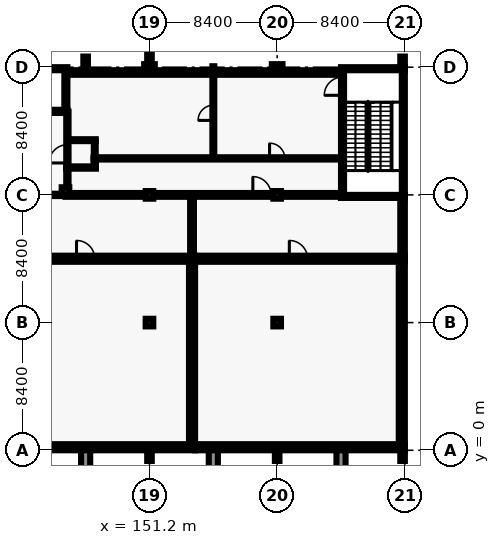
"""IFC4 building model, lengths in metres.
Left out: names, types, materials, properties, quantities, classifications, styles, units other than length and angle.
Written with IfcOpenShell. Run it as: python <this file> out.ifc"""

import sys

from ifc_helpers import new_model, si_unit, direction, frame, frame_2d, origin, origin_2d, place, context, subcontext, project, spatial, rectangle, extrude, element, fill, save


model = new_model("IFC4")
c1 = context("Model", 3, precision=1e-05, world=origin(), true_north=direction((0.0, 1.0)))
c2 = subcontext(c1, "Body", "Model", "MODEL_VIEW")
j1 = project(units=[si_unit("LENGTHUNIT", "METRE"), si_unit("PLANEANGLEUNIT", "RADIAN")], contexts=[c1])
p1 = place(None, origin())
s1 = spatial("IfcSite", under=j1, at=p1, CompositionType="ELEMENT")
p2 = place(p1, origin())
s2 = spatial("IfcBuilding", under=s1, at=p2, CompositionType="ELEMENT")
p3 = place(p2, frame((0.0, 0.0, 10.2)))
s3 = spatial("IfcBuildingStorey", under=s2, at=p3, CompositionType="ELEMENT", Elevation=10.2)
for number, where, z_axis, x_axis in (
    (1, (168.0, 16.7, 0.0), (0.0, 0.0, 1.0), (-1.0, 0.0, 0.0)),
    (2, (163.8, 25.1, 0.0), (0.0, 0.0, 1.0), (1.0, 0.0, 0.0)),
):
    element("IfcWall", number, at=place(p3, frame(where, z_axis=z_axis, x_axis=x_axis)), inside=s3, PredefinedType="SHEAR", context=c2, shape_type="SweptSolid", body=[
        extrude(rectangle(XDim=4.199, YDim=0.2, at=frame_2d((2.1, 0.0))), origin(), (0.0, 0.0, 1.0), 4.8),
    ])
p4 = place(p3, frame((163.9, 16.8, 0.0), z_axis=(0.0, 0.0, 1.0), x_axis=(0.0, 1.0, 0.0)))
e3 = element("IfcWall", 3, at=p4, inside=s3, PredefinedType="SHEAR", context=c2, shape_type="SweptSolid", body=[
    extrude(rectangle(XDim=8.2, YDim=0.2, at=frame_2d((4.1, 0.0))), origin(), (0.0, 0.0, 1.0), 4.8),
])
p5 = place(p4, frame((6.55, 0.0, 0.0)))
e4 = element("IfcOpeningElement", 4, at=p5, cuts=e3, PredefinedType="OPENING", context=c2, shape_type="SweptSolid", body=[
    extrude(rectangle(XDim=1.2, YDim=2.1, at=frame_2d((0.6, 1.05))), frame((0.0, 0.11, 0.0), z_axis=(0.0, -1.0, 0.0), x_axis=(1.0, 0.0, 0.0)), (0.0, 0.0, 1.0), 0.22),
])
p6 = place(p3, frame((167.9, 25.0, 0.0), z_axis=(0.0, 0.0, 1.0), x_axis=(0.0, -1.0, 0.0)))
e5 = element("IfcWall", 5, at=p6, inside=s3, PredefinedType="SHEAR", context=c2, shape_type="SweptSolid", body=[
    extrude(rectangle(XDim=8.2, YDim=0.2, at=frame_2d((4.1, 0.0))), origin(), (0.0, 0.0, 1.0), 4.8),
])
p7 = place(p3, frame((145.8, 22.3, 0.0), z_axis=(0.0, 0.0, 1.0), x_axis=(-1.0, 0.0, 0.0)))
e6 = element("IfcWall", 6, at=p7, inside=s3, PredefinedType="SHEAR", context=c2, shape_type="SweptSolid", body=[
    extrude(rectangle(XDim=4.2, YDim=0.2, at=frame_2d((2.1, 0.0))), origin(), (0.0, 0.0, 1.0), 4.8),
])
p8 = place(p7, frame((1.55, 0.0, 0.0)))
e7 = element("IfcOpeningElement", 7, at=p8, cuts=e6, PredefinedType="OPENING", context=c2, shape_type="SweptSolid", body=[
    extrude(rectangle(XDim=1.1, YDim=2.1, at=frame_2d((0.55, 1.05))), frame((0.0, 0.11, 0.0), z_axis=(0.0, -1.0, 0.0), x_axis=(1.0, 0.0, 0.0)), (0.0, 0.0, 1.0), 0.22),
])
p9 = place(p3, frame((141.6, 25.1, 0.0), z_axis=(0.0, 0.0, 1.0), x_axis=(1.0, 0.0, 0.0)))
e8 = element("IfcWall", 8, at=p9, inside=s3, PredefinedType="SHEAR", context=c2, shape_type="SweptSolid", body=[
    extrude(rectangle(XDim=4.2, YDim=0.2, at=frame_2d((2.1, 0.0))), origin(), (0.0, 0.0, 1.0), 4.8),
])
p10 = place(p3, frame((145.7, 25.0, 0.0), z_axis=(0.0, 0.0, 1.0), x_axis=(0.0, -1.0, 0.0)))
e9 = element("IfcWall", 9, at=p10, inside=s3, PredefinedType="SHEAR", context=c2, shape_type="SweptSolid", body=[
    extrude(rectangle(XDim=2.6, YDim=0.2, at=frame_2d((1.3, 0.0))), origin(), (0.0, 0.0, 1.0), 4.8),
])
p11 = place(p3, frame((154.2, 0.2, 0.0), z_axis=(0.0, 0.0, 1.0), x_axis=(-1.0, 0.0, 0.0)))
e10 = element("IfcWall", 10, at=p11, inside=s3, PredefinedType="SHEAR", context=c2, shape_type="SweptSolid", body=[
    extrude(rectangle(XDim=14.0, YDim=0.4, at=frame_2d((7.0, 0.0))), origin(), (0.0, 0.0, 1.0), 4.8),
])
p12 = place(p3, frame((140.2, 12.6, 0.0), z_axis=(0.0, 0.0, 1.0), x_axis=(1.0, 0.0, 0.0)))
e11 = element("IfcWall", 11, at=p12, inside=s3, PredefinedType="SHEAR", context=c2, shape_type="SweptSolid", body=[
    extrude(rectangle(XDim=14.0, YDim=0.4, at=frame_2d((7.0, 0.0))), origin(), (0.0, 0.0, 1.0), 4.8),
])
p13 = place(p12, frame((6.2, 0.0, 0.0)))
e12 = element("IfcOpeningElement", 12, at=p13, cuts=e11, PredefinedType="OPENING", context=c2, shape_type="SweptSolid", body=[
    extrude(rectangle(XDim=1.2, YDim=2.1, at=frame_2d((0.6, 1.05))), frame((0.0, 0.21, 0.0), z_axis=(0.0, -1.0, 0.0), x_axis=(1.0, 0.0, 0.0)), (0.0, 0.0, 1.0), 0.42),
])
p14 = place(p3, frame((154.0, 12.4, 0.0), z_axis=(0.0, 0.0, 1.0), x_axis=(0.0, -1.0, 0.0)))
e13 = element("IfcWall", 13, at=p14, inside=s3, PredefinedType="SHEAR", context=c2, shape_type="SweptSolid", body=[
    extrude(rectangle(XDim=12.0, YDim=0.4, at=frame_2d((6.0, 0.0))), origin(), (0.0, 0.0, 1.0), 4.8),
])
p15 = place(p3, frame((168.0, 0.2, 0.0), z_axis=(0.0, 0.0, 1.0), x_axis=(-1.0, 0.0, 0.0)))
e14 = element("IfcWall", 14, at=p15, inside=s3, PredefinedType="SHEAR", context=c2, shape_type="SweptSolid", body=[
    extrude(rectangle(XDim=13.8, YDim=0.4, at=frame_2d((6.9, 0.0))), origin(), (0.0, 0.0, 1.0), 4.8),
])
p16 = place(p3, frame((154.2, 12.6, 0.0), z_axis=(0.0, 0.0, 1.0), x_axis=(1.0, 0.0, 0.0)))
e15 = element("IfcWall", 15, at=p16, inside=s3, PredefinedType="SHEAR", context=c2, shape_type="SweptSolid", body=[
    extrude(rectangle(XDim=13.8, YDim=0.4, at=frame_2d((6.9, 0.0))), origin(), (0.0, 0.0, 1.0), 4.8),
])
p17 = place(p16, frame((6.2, 0.0, 0.0)))
e16 = element("IfcOpeningElement", 16, at=p17, cuts=e15, PredefinedType="OPENING", context=c2, shape_type="SweptSolid", body=[
    extrude(rectangle(XDim=1.2, YDim=2.1, at=frame_2d((0.6, 1.05))), frame((0.0, 0.21, 0.0), z_axis=(0.0, -1.0, 0.0), x_axis=(1.0, 0.0, 0.0)), (0.0, 0.0, 1.0), 0.42),
])
p18 = place(p3, frame((167.8, 12.4, 0.0), z_axis=(0.0, 0.0, 1.0), x_axis=(0.0, -1.0, 0.0)))
e17 = element("IfcWall", 17, at=p18, inside=s3, PredefinedType="SHEAR", context=c2, shape_type="SweptSolid", body=[
    extrude(rectangle(XDim=12.0, YDim=0.4, at=frame_2d((6.0, 0.0))), origin(), (0.0, 0.0, 1.0), 4.8),
])
p19 = place(p3, frame((167.85, 16.6, 0.0), z_axis=(0.0, 0.0, 1.0), x_axis=(0.0, -1.0, 0.0)))
e18 = element("IfcWall", 18, at=p19, inside=s3, PredefinedType="SOLIDWALL", context=c2, shape_type="SweptSolid", body=[
    extrude(rectangle(XDim=3.8, YDim=0.3, at=frame_2d((1.9, 0.0))), origin(), (0.0, 0.0, 1.0), 4.8),
])
for number, where, z_axis, x_axis in (
    (19, (151.2, 8.4, 0.0), (0.0, 0.0, 1.0), (1.0, 0.0, 0.0)),
    (20, (151.2, 16.8, 0.0), (0.0, 0.0, 1.0), (1.0, 0.0, 0.0)),
):
    element("IfcColumn", number, at=place(p3, frame(where, z_axis=z_axis, x_axis=x_axis)), inside=s3, PredefinedType="COLUMN", context=c2, shape_type="SweptSolid", body=[
        extrude(rectangle(XDim=0.5, YDim=0.5, at=origin_2d()), origin(), (0.0, 0.0, 1.0), 4.8),
    ])
p20 = place(p3, frame((151.2, 25.2, 0.0), z_axis=(0.0, 0.0, 1.0), x_axis=(1.0, 0.0, 0.0)))
e21 = element("IfcColumn", 21, at=p20, inside=s3, PredefinedType="COLUMN", context=c2, shape_type="SweptSolid", body=[
    extrude(rectangle(XDim=0.7, YDim=0.4, at=origin_2d()), origin(), (0.0, 0.0, 1.0), 4.8),
])
for number, where, z_axis, x_axis in (
    (22, (159.6, 8.4, 0.0), (0.0, 0.0, 1.0), (1.0, 0.0, 0.0)),
    (23, (159.6, 16.8, 0.0), (0.0, 0.0, 1.0), (1.0, 0.0, 0.0)),
):
    element("IfcColumn", number, at=place(p3, frame(where, z_axis=z_axis, x_axis=x_axis)), inside=s3, PredefinedType="COLUMN", context=c2, shape_type="SweptSolid", body=[
        extrude(rectangle(XDim=0.5, YDim=0.5, at=origin_2d()), origin(), (0.0, 0.0, 1.0), 4.8),
    ])
p21 = place(p3, frame((159.6, 25.2, 0.0), z_axis=(0.0, 0.0, 1.0), x_axis=(1.0, 0.0, 0.0)))
e24 = element("IfcColumn", 24, at=p21, inside=s3, PredefinedType="COLUMN", context=c2, shape_type="SweptSolid", body=[
    extrude(rectangle(XDim=0.7, YDim=0.4, at=origin_2d()), origin(), (0.0, 0.0, 1.0), 4.8),
])
p22 = place(p3, frame((145.675, 17.05, 0.0), z_axis=(0.0, 0.0, 1.0), x_axis=(1.0, 0.0, 0.0)))
e25 = element("IfcColumn", 25, at=p22, inside=s3, PredefinedType="COLUMN", context=c2, shape_type="SweptSolid", body=[
    extrude(rectangle(XDim=0.5, YDim=0.5, at=origin_2d()), origin(), (0.0, 0.0, 1.0), 4.8),
])
for number, where, z_axis, x_axis in (
    (26, (151.2, -0.35, 0.0), (0.0, 0.0, 1.0), (1.0, 0.0, 0.0)),
    (27, (159.6, -0.35, 0.0), (0.0, 0.0, 1.0), (1.0, 0.0, 0.0)),
    (28, (167.85, -0.35, 0.0), (0.0, 0.0, 1.0), (1.0, 0.0, 0.0)),
):
    element("IfcColumn", number, at=place(p3, frame(where, z_axis=z_axis, x_axis=x_axis)), inside=s3, PredefinedType="PILASTER", context=c2, shape_type="SweptSolid", body=[
        extrude(rectangle(XDim=0.3, YDim=0.7, at=origin_2d()), origin(), (0.0, 0.0, 1.0), 4.8),
    ])
p23 = place(p3, frame((145.8, 24.85, 0.0), z_axis=(0.0, 0.0, 1.0), x_axis=(1.0, 0.0, 0.0)))
e29 = element("IfcWall", 29, at=p23, inside=s3, PredefinedType="SOLIDWALL", context=c2, shape_type="SweptSolid", body=[
    extrude(rectangle(XDim=18.0, YDim=0.3, at=frame_2d((9.0, 0.0))), origin(), (0.0, 0.0, 1.0), 4.5),
])
p24 = place(p23, frame((2.7, 0.0, 1.5)))
e30 = element("IfcOpeningElement", 30, at=p24, cuts=e29, PredefinedType="OPENING", context=c2, shape_type="SweptSolid", body=[
    extrude(rectangle(XDim=1.2, YDim=0.9, at=frame_2d((0.6, 0.45))), frame((0.0, 0.16, 0.0), z_axis=(0.0, -1.0, 0.0), x_axis=(1.0, 0.0, 0.0)), (0.0, 0.0, 1.0), 0.32),
])
p25 = place(p23, frame((6.9, 0.0, 1.5)))
e31 = element("IfcOpeningElement", 31, at=p25, cuts=e29, PredefinedType="OPENING", context=c2, shape_type="SweptSolid", body=[
    extrude(rectangle(XDim=1.2, YDim=0.9, at=frame_2d((0.6, 0.45))), frame((0.0, 0.16, 0.0), z_axis=(0.0, -1.0, 0.0), x_axis=(1.0, 0.0, 0.0)), (0.0, 0.0, 1.0), 0.32),
])
for number, where, z_axis, x_axis in (
    (32, (147.0, 25.55, 0.0), (0.0, 0.0, 1.0), (1.0, 0.0, 0.0)),
    (33, (151.2, 25.75, 0.0), (0.0, 0.0, 1.0), (1.0, 0.0, 0.0)),
    (34, (167.85, 25.55, 0.0), (0.0, 0.0, 1.0), (1.0, 0.0, 0.0)),
):
    element("IfcColumn", number, at=place(p3, frame(where, z_axis=z_axis, x_axis=x_axis)), inside=s3, PredefinedType="PILASTER", context=c2, shape_type="SweptSolid", body=[
        extrude(rectangle(XDim=0.3, YDim=0.7, at=origin_2d()), origin(), (0.0, 0.0, 1.0), 4.8),
    ])
for number, where, z_axis, x_axis in (
    (35, (147.0, 0.0, 0.0), (0.0, 0.0, 1.0), (0.0, -1.0, 0.0)),
    (36, (155.4, 0.0, 0.0), (0.0, 0.0, 1.0), (0.0, -1.0, 0.0)),
    (37, (163.8, 0.0, 0.0), (0.0, 0.0, 1.0), (0.0, -1.0, 0.0)),
):
    element("IfcWall", number, at=place(p3, frame(where, z_axis=z_axis, x_axis=x_axis)), inside=s3, PredefinedType="SOLIDWALL", context=c2, shape_type="SweptSolid", body=[
        extrude(rectangle(XDim=1.5, YDim=0.6, at=frame_2d((0.75, 0.0))), origin(), (0.0, 0.0, 1.0), 4.8),
    ])
p26 = place(p3, frame((145.675, 16.8, 0.0), z_axis=(0.0, 0.0, 1.0), x_axis=(1.0, 0.0, 0.0)))
e38 = element("IfcWall", 38, at=p26, inside=s3, PredefinedType="PARTITIONING", context=c2, shape_type="SweptSolid", body=[
    extrude(rectangle(XDim=18.125, YDim=0.25, at=frame_2d((9.062, 0.0))), origin(), (0.0, 0.0, 1.0), 3.8),
])
p27 = place(p26, frame((12.325, 0.0, 0.0)))
e39 = element("IfcOpeningElement", 39, at=p27, cuts=e38, PredefinedType="OPENING", context=c2, shape_type="SweptSolid", body=[
    extrude(rectangle(XDim=1.2, YDim=2.1, at=frame_2d((0.6, 1.05))), frame((0.0, 0.135, 0.0), z_axis=(0.0, -1.0, 0.0), x_axis=(1.0, 0.0, 0.0)), (0.0, 0.0, 1.0), 0.27),
])
p28 = place(p3, frame((154.0, 12.8, 0.0), z_axis=(0.0, 0.0, 1.0), x_axis=(0.0, 1.0, 0.0)))
e40 = element("IfcWall", 40, at=p28, inside=s3, PredefinedType="PARTITIONING", context=c2, shape_type="SweptSolid", body=[
    extrude(rectangle(XDim=3.875, YDim=0.25, at=frame_2d((1.938, 0.0))), origin(), (0.0, 0.0, 1.0), 3.8),
])
p29 = place(p3, frame((145.725, 18.6, 0.0), z_axis=(0.0, 0.0, 1.0), x_axis=(1.0, 0.0, 0.0)))
e41 = element("IfcWall", 41, at=p29, inside=s3, PredefinedType="PARTITIONING", context=c2, shape_type="SweptSolid", body=[
    extrude(rectangle(XDim=1.95, YDim=0.15, at=frame_2d((0.975, 0.0))), origin(), (0.0, 0.0, 1.0), 4.5),
])
p30 = place(p3, frame((147.525, 19.2, 0.0), z_axis=(0.0, 0.0, 1.0), x_axis=(1.0, 0.0, 0.0)))
e42 = element("IfcWall", 42, at=p30, inside=s3, PredefinedType="PARTITIONING", context=c2, shape_type="SweptSolid", body=[
    extrude(rectangle(XDim=16.275, YDim=0.15, at=frame_2d((8.137, 0.0))), origin(), (0.0, 0.0, 1.0), 3.8),
])
p31 = place(p30, frame((11.575, 0.0, 0.0)))
e43 = element("IfcOpeningElement", 43, at=p31, cuts=e42, PredefinedType="OPENING", context=c2, shape_type="SweptSolid", body=[
    extrude(rectangle(XDim=1.0, YDim=2.1, at=frame_2d((0.5, 1.05))), frame((0.0, 0.085, 0.0), z_axis=(0.0, -1.0, 0.0), x_axis=(1.0, 0.0, 0.0)), (0.0, 0.0, 1.0), 0.17),
])
p32 = place(p3, frame((140.125, 16.8, 0.0), z_axis=(0.0, 0.0, 1.0), x_axis=(1.0, 0.0, 0.0)))
e44 = element("IfcWall", 44, at=p32, inside=s3, PredefinedType="SOLIDWALL", context=c2, shape_type="SweptSolid", body=[
    extrude(rectangle(XDim=5.55, YDim=0.15, at=frame_2d((2.775, 0.0))), origin(), (0.0, 0.0, 1.0), 3.8),
])
p33 = place(p32, frame((3.075, 0.0, 0.0)))
e45 = element("IfcOpeningElement", 45, at=p33, cuts=e44, PredefinedType="OPENING", context=c2, shape_type="SweptSolid", body=[
    extrude(rectangle(XDim=1.2, YDim=2.1, at=frame_2d((0.6, 1.05))), frame((0.0, 0.085, 0.0), z_axis=(0.0, -1.0, 0.0), x_axis=(1.0, 0.0, 0.0)), (0.0, 0.0, 1.0), 0.17),
])
p34 = place(p3, frame((147.6, 18.675, 0.0), z_axis=(0.0, 0.0, 1.0), x_axis=(0.0, 1.0, 0.0)))
e46 = element("IfcWall", 46, at=p34, inside=s3, PredefinedType="PARTITIONING", context=c2, shape_type="SweptSolid", body=[
    extrude(rectangle(XDim=0.45, YDim=0.15, at=frame_2d((0.225, 0.0))), origin(), (0.0, 0.0, 1.0), 4.5),
])
p35 = place(p3, frame((145.8, 16.925, 0.0), z_axis=(0.0, 0.0, 1.0), x_axis=(0.0, 1.0, 0.0)))
e47 = element("IfcWall", 47, at=p35, inside=s3, PredefinedType="SOLIDWALL", context=c2, shape_type="SweptSolid", body=[
    extrude(rectangle(XDim=1.6, YDim=0.15, at=frame_2d((0.8, 0.0))), origin(), (0.0, 0.0, 1.0), 3.8),
])
p36 = place(p3, frame((145.8, 18.675, 0.0), z_axis=(0.0, 0.0, 1.0), x_axis=(0.0, 1.0, 0.0)))
e48 = element("IfcWall", 48, at=p36, inside=s3, PredefinedType="SOLIDWALL", context=c2, shape_type="SweptSolid", body=[
    extrude(rectangle(XDim=3.6, YDim=0.15, at=frame_2d((1.8, 0.0))), origin(), (0.0, 0.0, 1.0), 4.5),
])
p37 = place(p36, frame((0.225, 0.0, 0.0)))
e49 = element("IfcOpeningElement", 49, at=p37, cuts=e48, PredefinedType="OPENING", context=c2, shape_type="SweptSolid", body=[
    extrude(rectangle(XDim=1.2, YDim=2.1, at=frame_2d((0.6, 1.05))), frame((0.0, 0.085, 0.0), z_axis=(0.0, -1.0, 0.0), x_axis=(1.0, 0.0, 0.0)), (0.0, 0.0, 1.0), 0.17),
])
p38 = place(p3, frame((145.875, 20.4, 0.0), z_axis=(0.0, 0.0, 1.0), x_axis=(1.0, 0.0, 0.0)))
e50 = element("IfcWall", 50, at=p38, inside=s3, PredefinedType="PARTITIONING", context=c2, shape_type="SweptSolid", body=[
    extrude(rectangle(XDim=1.788, YDim=0.125, at=frame_2d((0.894, 0.0))), origin(), (0.0, 0.0, 1.0), 4.5),
])
p39 = place(p3, frame((147.6, 19.275, 0.0), z_axis=(0.0, 0.0, 1.0), x_axis=(0.0, 1.0, 0.0)))
e51 = element("IfcWall", 51, at=p39, inside=s3, PredefinedType="PARTITIONING", context=c2, shape_type="SweptSolid", body=[
    extrude(rectangle(XDim=1.062, YDim=0.125, at=frame_2d((0.531, 0.0))), origin(), (0.0, 0.0, 1.0), 4.5),
])
p40 = place(p3, frame((155.4, 19.275, 0.0), z_axis=(0.0, 0.0, 1.0), x_axis=(0.0, 1.0, 0.0)))
e52 = element("IfcWall", 52, at=p40, inside=s3, PredefinedType="PARTITIONING", context=c2, shape_type="SweptSolid", body=[
    extrude(rectangle(XDim=5.425, YDim=0.125, at=frame_2d((2.712, 0.0))), origin(), (0.0, 0.0, 1.0), 3.8),
])
p41 = place(p40, frame((2.425, 0.0, 0.0)))
e53 = element("IfcOpeningElement", 53, at=p41, cuts=e52, PredefinedType="OPENING", context=c2, shape_type="SweptSolid", body=[
    extrude(rectangle(XDim=1.0, YDim=2.1, at=frame_2d((0.5, 1.05))), frame((0.0, 0.073, 0.0), z_axis=(0.0, -1.0, 0.0), x_axis=(1.0, 0.0, 0.0)), (0.0, 0.0, 1.0), 0.145),
])
p42 = place(p3, frame((155.4, 25.0, 0.0), z_axis=(0.0, 0.0, 1.0), x_axis=(0.0, 1.0, 0.0)))
e54 = element("IfcWall", 54, at=p42, inside=s3, PredefinedType="PARTITIONING", context=c2, shape_type="SweptSolid", body=[
    extrude(rectangle(XDim=0.262, YDim=0.125, at=frame_2d((0.131, 0.0))), origin(), (0.0, 0.0, 1.0), 3.8),
])
p43 = place(p24, origin())
e55 = element("IfcWindow", 55, at=p43, inside=s3, PartitioningType="SINGLE_PANEL", PredefinedType="WINDOW", context=c2, shape_type="SweptSolid", body=[
    extrude(rectangle(XDim=1.2, YDim=0.9, at=frame_2d((0.6, 0.45))), frame((0.0, 0.03, 0.0), z_axis=(0.0, -1.0, 0.0), x_axis=(1.0, 0.0, 0.0)), (0.0, 0.0, 1.0), 0.06),
])
fill(e30, e55)
p44 = place(p25, origin())
e56 = element("IfcWindow", 56, at=p44, inside=s3, PartitioningType="SINGLE_PANEL", PredefinedType="WINDOW", context=c2, shape_type="SweptSolid", body=[
    extrude(rectangle(XDim=1.2, YDim=0.9, at=frame_2d((0.6, 0.45))), frame((0.0, 0.03, 0.0), z_axis=(0.0, -1.0, 0.0), x_axis=(1.0, 0.0, 0.0)), (0.0, 0.0, 1.0), 0.06),
])
fill(e31, e56)
p45 = place(p5, origin())
e57 = element("IfcDoor", 57, at=p45, inside=s3, OperationType="SINGLE_SWING_RIGHT", PredefinedType="DOOR", context=c2, shape_type="SweptSolid", body=[
    extrude(rectangle(XDim=1.2, YDim=2.1, at=frame_2d((0.6, 1.05))), frame((0.0, 0.025, 0.0), z_axis=(0.0, -1.0, 0.0), x_axis=(1.0, 0.0, 0.0)), (0.0, 0.0, 1.0), 0.05),
])
fill(e4, e57)
p46 = place(p31, origin())
e58 = element("IfcDoor", 58, at=p46, inside=s3, OperationType="SINGLE_SWING_RIGHT", PredefinedType="DOOR", context=c2, shape_type="SweptSolid", body=[
    extrude(rectangle(XDim=1.0, YDim=2.1, at=frame_2d((0.5, 1.05))), frame((0.0, 0.025, 0.0), z_axis=(0.0, -1.0, 0.0), x_axis=(1.0, 0.0, 0.0)), (0.0, 0.0, 1.0), 0.05),
])
fill(e43, e58)
p47 = place(p41, origin())
e59 = element("IfcDoor", 59, at=p47, inside=s3, OperationType="SINGLE_SWING_RIGHT", PredefinedType="DOOR", context=c2, shape_type="SweptSolid", body=[
    extrude(rectangle(XDim=1.0, YDim=2.1, at=frame_2d((0.5, 1.05))), frame((0.0, 0.025, 0.0), z_axis=(0.0, -1.0, 0.0), x_axis=(1.0, 0.0, 0.0)), (0.0, 0.0, 1.0), 0.05),
])
fill(e53, e59)
p48 = place(p37, origin())
e60 = element("IfcDoor", 60, at=p48, inside=s3, OperationType="SINGLE_SWING_RIGHT", PredefinedType="DOOR", context=c2, shape_type="SweptSolid", body=[
    extrude(rectangle(XDim=1.2, YDim=2.1, at=frame_2d((0.6, 1.05))), frame((0.0, 0.025, 0.0), z_axis=(0.0, -1.0, 0.0), x_axis=(1.0, 0.0, 0.0)), (0.0, 0.0, 1.0), 0.05),
])
fill(e49, e60)
p49 = place(p27, origin())
e61 = element("IfcDoor", 61, at=p49, inside=s3, OperationType="SINGLE_SWING_LEFT", PredefinedType="DOOR", context=c2, shape_type="SweptSolid", body=[
    extrude(rectangle(XDim=1.2, YDim=2.1, at=frame_2d((0.6, 1.05))), frame((0.0, 0.025, 0.0), z_axis=(0.0, -1.0, 0.0), x_axis=(1.0, 0.0, 0.0)), (0.0, 0.0, 1.0), 0.05),
])
fill(e39, e61)
p50 = place(p13, origin())
e62 = element("IfcDoor", 62, at=p50, inside=s3, OperationType="SINGLE_SWING_RIGHT", PredefinedType="DOOR", context=c2, shape_type="SweptSolid", body=[
    extrude(rectangle(XDim=1.2, YDim=2.1, at=frame_2d((0.6, 1.05))), frame((0.0, 0.025, 0.0), z_axis=(0.0, -1.0, 0.0), x_axis=(1.0, 0.0, 0.0)), (0.0, 0.0, 1.0), 0.05),
])
fill(e12, e62)
p51 = place(p17, origin())
e63 = element("IfcDoor", 63, at=p51, inside=s3, OperationType="SINGLE_SWING_RIGHT", PredefinedType="DOOR", context=c2, shape_type="SweptSolid", body=[
    extrude(rectangle(XDim=1.2, YDim=2.1, at=frame_2d((0.6, 1.05))), frame((0.0, 0.025, 0.0), z_axis=(0.0, -1.0, 0.0), x_axis=(1.0, 0.0, 0.0)), (0.0, 0.0, 1.0), 0.05),
])
fill(e16, e63)
save(model, sys.argv[1])
